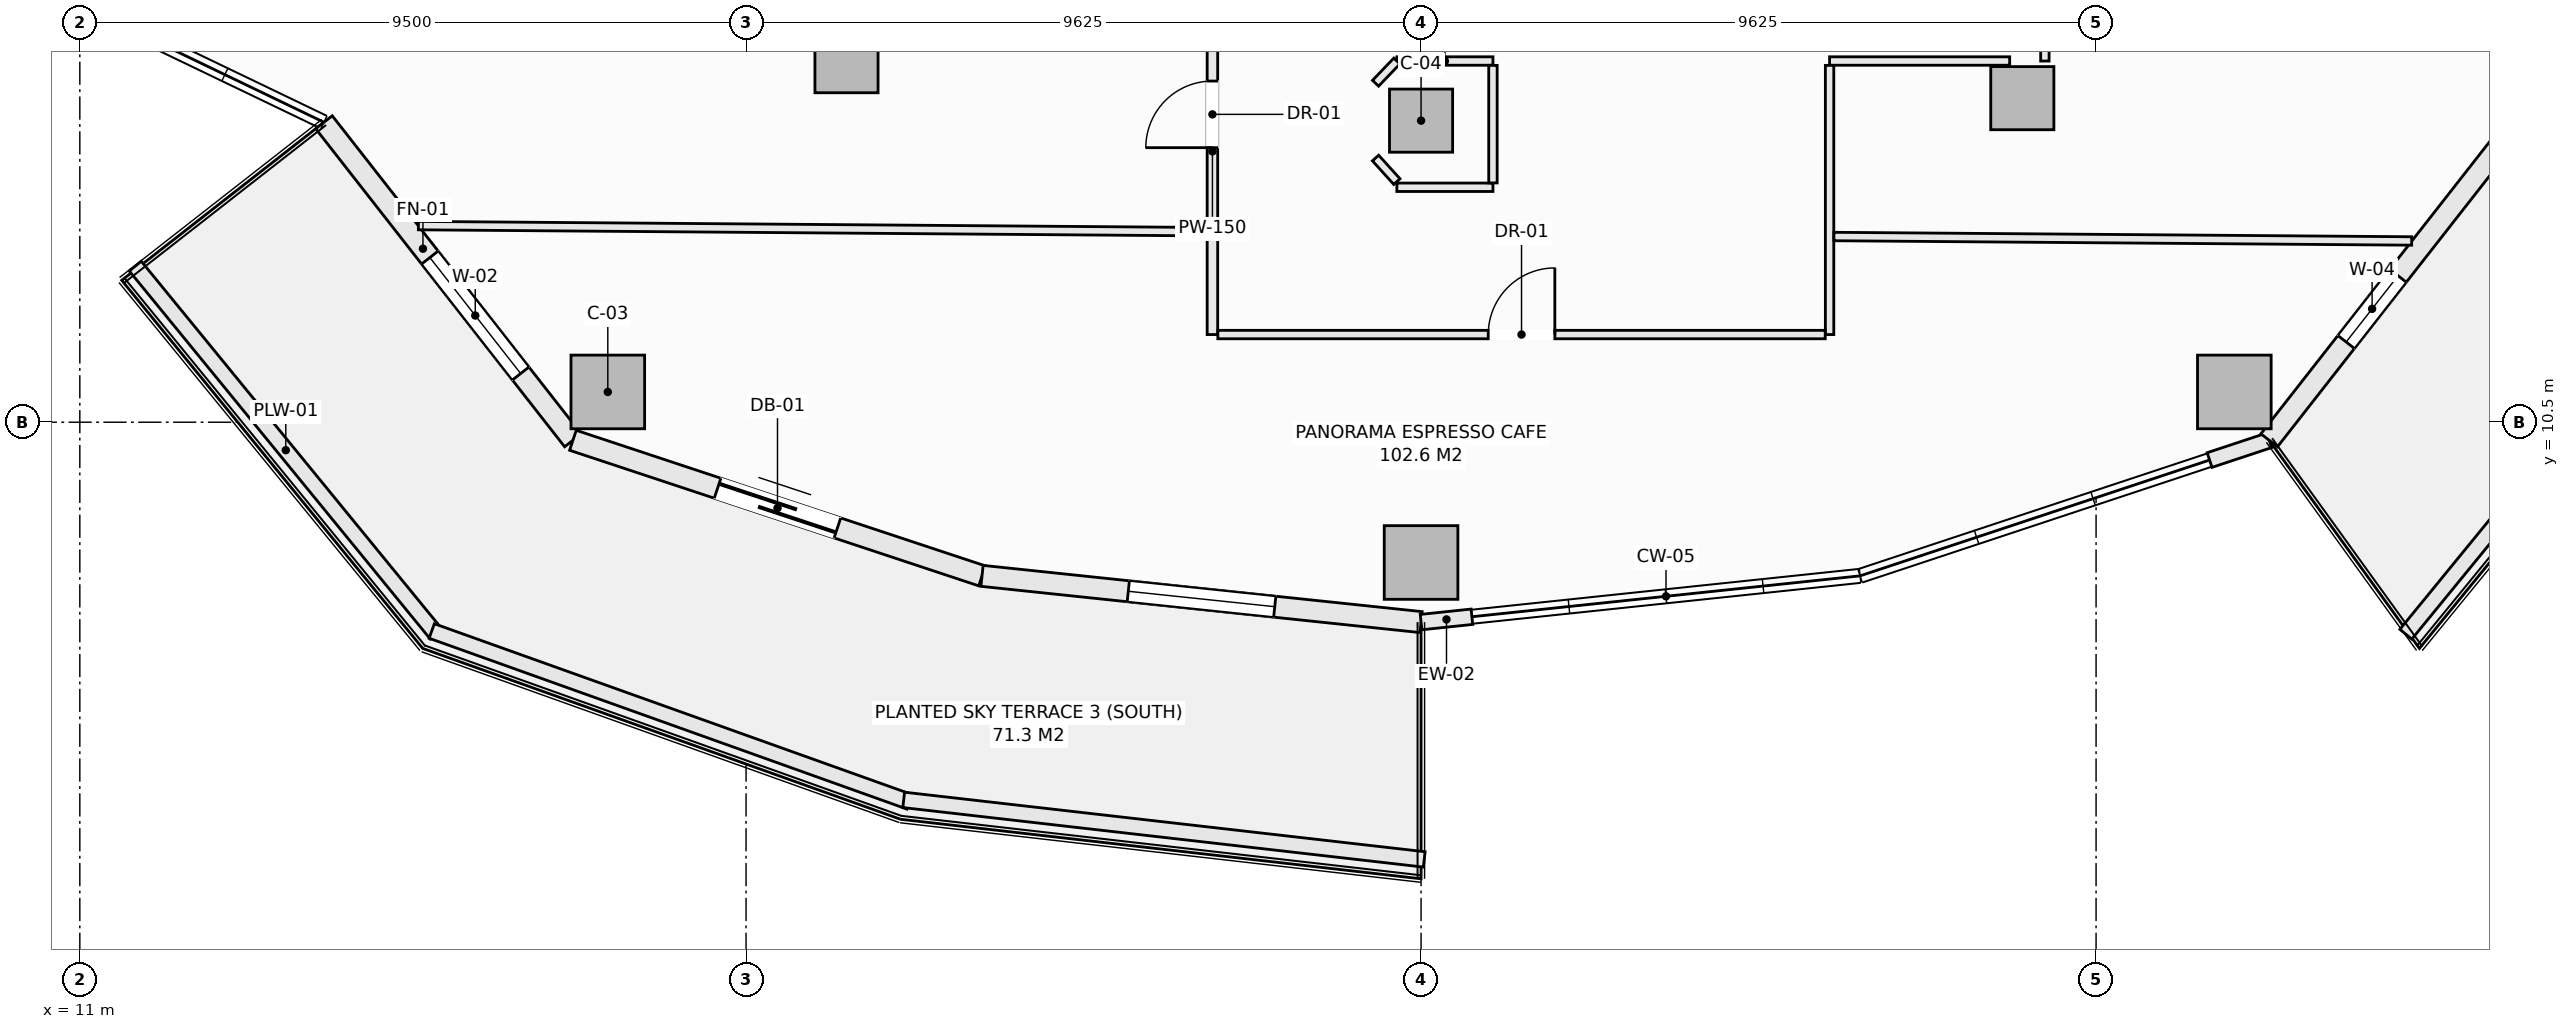
"""IFC4 building model, lengths in metres.
Left out: names, types, materials, properties, quantities, classifications, styles, units other than length and angle.
Written with IfcOpenShell. Run it as: python <this file> out.ifc"""

import sys

from ifc_helpers import new_model, si_unit, direction, frame, frame_2d, origin, origin_2d, place, context, subcontext, project, spatial, rectangle, extrude, element, fill, save


model = new_model("IFC4")
c1 = context("Model", 3, precision=1e-05, world=origin(), true_north=direction((0.0, 1.0)))
c2 = subcontext(c1, "Body", "Model", "MODEL_VIEW")
j1 = project(units=[si_unit("LENGTHUNIT", "METRE"), si_unit("PLANEANGLEUNIT", "RADIAN")], contexts=[c1])
p1 = place(None, origin())
s1 = spatial("IfcSite", under=j1, at=p1, CompositionType="ELEMENT")
p2 = place(p1, origin())
s2 = spatial("IfcBuilding", under=s1, at=p2, CompositionType="ELEMENT")
p3 = place(p2, frame((0.0, 0.0, 100.8)))
s3 = spatial("IfcBuildingStorey", under=s2, at=p3, CompositionType="ELEMENT", Elevation=100.8)
for number, where, z_axis, x_axis in (
    (1, (18.529, 10.932, -0.28), (0.0, 0.0, 1.0), (1.0, 0.0, 0.0)),
    (2, (30.125, 8.5, -0.28), (0.0, 0.0, 1.0), (1.0, 0.0, 0.0)),
    (3, (41.721, 10.932, -0.28), (0.0, 0.0, 1.0), (1.0, 0.0, 0.0)),
):
    element("IfcColumn", number, at=place(p3, frame(where, z_axis=z_axis, x_axis=x_axis)), inside=s3, PredefinedType="COLUMN", context=c2, shape_type="SweptSolid", body=[
        extrude(rectangle(XDim=1.05, YDim=1.05, at=origin_2d()), origin(), (0.0, 0.0, 1.0), 4.51),
    ])
for number, where, z_axis, x_axis in (
    (4, (21.932, 15.648, -0.28), (0.0, 0.0, 1.0), (1.0, 0.0, 0.0)),
    (5, (30.125, 14.8, -0.28), (0.0, 0.0, 1.0), (1.0, 0.0, 0.0)),
    (6, (38.698, 15.121, -0.28), (0.0, 0.0, 1.0), (1.0, 0.0, 0.0)),
):
    element("IfcColumn", number, at=place(p3, frame(where, z_axis=z_axis, x_axis=x_axis)), inside=s3, PredefinedType="COLUMN", context=c2, shape_type="SweptSolid", body=[
        extrude(rectangle(XDim=0.9, YDim=0.9, at=origin_2d()), origin(), (0.0, 0.0, 1.0), 4.51),
    ])
p4 = place(p3, frame((14.481, 14.777, 0.0), z_axis=(0.0, 0.0, 1.0), x_axis=(0.616435134162, -0.787405693001, 0.0)))
e7 = element("IfcWall", 7, at=p4, inside=s3, PredefinedType="SOLIDWALL", context=c2, shape_type="SweptSolid", body=[
    extrude(rectangle(XDim=5.759, YDim=0.3, at=frame_2d((2.879, 0.0))), origin(), (0.0, 0.0, 1.0), 3.753),
])
p5 = place(p4, frame((2.45, 0.0, 0.74)))
e8 = element("IfcOpeningElement", 8, at=p5, cuts=e7, PredefinedType="OPENING", context=c2, shape_type="SweptSolid", body=[
    extrude(rectangle(XDim=2.1, YDim=1.7, at=frame_2d((1.05, 0.85))), frame((0.0, 0.16, 0.0), z_axis=(0.0, -1.0, 0.0), x_axis=(1.0, 0.0, 0.0)), (0.0, 0.0, 1.0), 0.32),
])
p6 = place(p3, frame((18.031, 10.242, 0.0), z_axis=(0.0, 0.0, 1.0), x_axis=(0.949238009374, -0.314558741032, 0.0)))
e9 = element("IfcWall", 9, at=p6, inside=s3, PredefinedType="SOLIDWALL", context=c2, shape_type="SweptSolid", body=[
    extrude(rectangle(XDim=6.146, YDim=0.3, at=frame_2d((3.073, 0.0))), origin(), (0.0, 0.0, 1.0), 3.753),
])
p7 = place(p6, frame((2.173, 0.0, 0.0)))
e10 = element("IfcOpeningElement", 10, at=p7, cuts=e9, PredefinedType="OPENING", context=c2, shape_type="SweptSolid", body=[
    extrude(rectangle(XDim=1.8, YDim=2.25, at=frame_2d((0.9, 1.125))), frame((0.0, 0.16, 0.0), z_axis=(0.0, -1.0, 0.0), x_axis=(1.0, 0.0, 0.0)), (0.0, 0.0, 1.0), 0.32),
])
p8 = place(p3, frame((23.865, 8.309, 0.0), z_axis=(0.0, 0.0, 1.0), x_axis=(0.994498012394, -0.104755445421, 0.0)))
e11 = element("IfcWall", 11, at=p8, inside=s3, PredefinedType="SOLIDWALL", context=c2, shape_type="SweptSolid", body=[
    extrude(rectangle(XDim=6.295, YDim=0.3, at=frame_2d((3.147, 0.0))), origin(), (0.0, 0.0, 1.0), 3.753),
])
p9 = place(p8, frame((2.097, 0.0, 0.74)))
e12 = element("IfcOpeningElement", 12, at=p9, cuts=e11, PredefinedType="OPENING", context=c2, shape_type="SweptSolid", body=[
    extrude(rectangle(XDim=2.1, YDim=1.7, at=frame_2d((1.05, 0.85))), frame((0.0, 0.16, 0.0), z_axis=(0.0, -1.0, 0.0), x_axis=(1.0, 0.0, 0.0)), (0.0, 0.0, 1.0), 0.32),
])
p10 = place(p3, frame((30.125, 7.65, 0.0), z_axis=(0.0, 0.0, 1.0), x_axis=(0.994492602029, 0.104806796106, 0.0)))
e13 = element("IfcWall", 13, at=p10, inside=s3, PredefinedType="SOLIDWALL", context=c2, shape_type="SweptSolid", body=[
    extrude(rectangle(XDim=0.729, YDim=0.22, at=frame_2d((0.365, 0.0))), origin(), (0.0, 0.0, 1.0), 3.753),
])
p11 = place(p3, frame((41.369, 9.961, 0.0), z_axis=(0.0, 0.0, 1.0), x_axis=(0.949227107477, 0.314591637573, 0.0)))
e14 = element("IfcWall", 14, at=p11, inside=s3, PredefinedType="SOLIDWALL", context=c2, shape_type="SweptSolid", body=[
    extrude(rectangle(XDim=0.896, YDim=0.22, at=frame_2d((0.448, 0.0))), origin(), (0.0, 0.0, 1.0), 3.753),
])
p12 = place(p3, frame((42.219, 10.242, 0.0), z_axis=(0.0, 0.0, 1.0), x_axis=(0.616435134162, 0.787405693001, 0.0)))
e15 = element("IfcWall", 15, at=p12, inside=s3, PredefinedType="SOLIDWALL", context=c2, shape_type="SweptSolid", body=[
    extrude(rectangle(XDim=5.759, YDim=0.3, at=frame_2d((2.879, 0.0))), origin(), (0.0, 0.0, 1.0), 3.753),
])
p13 = place(p12, frame((1.78, 0.0, 0.72)))
e16 = element("IfcOpeningElement", 16, at=p13, cuts=e15, PredefinedType="OPENING", context=c2, shape_type="SweptSolid", body=[
    extrude(rectangle(XDim=1.2, YDim=1.65, at=frame_2d((0.6, 0.825))), frame((0.0, 0.16, 0.0), z_axis=(0.0, -1.0, 0.0), x_axis=(1.0, 0.0, 0.0)), (0.0, 0.0, 1.0), 0.32),
])
p14 = place(p3, frame((11.791, 12.726, 0.0), z_axis=(0.0, 0.0, 1.0), x_axis=(0.633002467947, -0.77414977593, 0.0)))
e17 = element("IfcWall", 17, at=p14, inside=s3, PredefinedType="PARAPET", context=c2, shape_type="SweptSolid", body=[
    extrude(rectangle(XDim=6.78, YDim=0.22, at=frame_2d((3.39, 0.0))), origin(), (0.0, 0.0, 1.0), 0.52),
])
p15 = place(p3, frame((16.018, 7.523, 0.0), z_axis=(0.0, 0.0, 1.0), x_axis=(0.941632697311, -0.336642040387, 0.0)))
e18 = element("IfcWall", 18, at=p15, inside=s3, PredefinedType="PARAPET", context=c2, shape_type="SweptSolid", body=[
    extrude(rectangle(XDim=7.236, YDim=0.22, at=frame_2d((3.618, 0.0))), origin(), (0.0, 0.0, 1.0), 0.52),
])
p16 = place(p3, frame((22.748, 5.115, 0.0), z_axis=(0.0, 0.0, 1.0), x_axis=(0.993527615836, -0.11359082961, 0.0)))
e19 = element("IfcWall", 19, at=p16, inside=s3, PredefinedType="PARAPET", context=c2, shape_type="SweptSolid", body=[
    extrude(rectangle(XDim=7.471, YDim=0.22, at=frame_2d((3.735, 0.0))), origin(), (0.0, 0.0, 1.0), 0.52),
])
p17 = place(p3, frame((44.167, 7.477, 0.0), z_axis=(0.0, 0.0, 1.0), x_axis=(0.633002467947, 0.77414977593, 0.0)))
e20 = element("IfcWall", 20, at=p17, inside=s3, PredefinedType="PARAPET", context=c2, shape_type="SweptSolid", body=[
    extrude(rectangle(XDim=6.78, YDim=0.22, at=frame_2d((3.39, 0.0))), origin(), (0.0, 0.0, 1.0), 0.52),
])
p18 = place(p3, frame((27.15, 11.75, 0.0), z_axis=(0.0, 0.0, 1.0), x_axis=(0.0, 1.0, 0.0)))
e21 = element("IfcWall", 21, at=p18, inside=s3, PredefinedType="PARTITIONING", context=c2, shape_type="SweptSolid", body=[
    extrude(rectangle(XDim=5.223, YDim=0.15, at=frame_2d((2.611, 0.0))), origin(), (0.0, 0.0, 1.0), 4.23),
])
p19 = place(p18, frame((2.665, 0.0, 0.0)))
e22 = element("IfcOpeningElement", 22, at=p19, cuts=e21, PredefinedType="OPENING", context=c2, shape_type="SweptSolid", body=[
    extrude(rectangle(XDim=0.95, YDim=2.1, at=frame_2d((0.475, 1.05))), frame((0.0, 0.085, 0.0), z_axis=(0.0, -1.0, 0.0), x_axis=(1.0, 0.0, 0.0)), (0.0, 0.0, 1.0), 0.17),
])
p20 = place(p3, frame((29.78, 15.65, 0.0), z_axis=(0.0, 0.0, 1.0), x_axis=(1.0, 0.0, 0.0)))
e23 = element("IfcWall", 23, at=p20, inside=s3, PredefinedType="PARTITIONING", context=c2, shape_type="SweptSolid", body=[
    extrude(rectangle(XDim=1.37, YDim=0.12, at=frame_2d((0.685, 0.0))), origin(), (0.0, 0.0, 1.0), 4.23),
])
p21 = place(p3, frame((35.95, 15.65, 0.0), z_axis=(0.0, 0.0, 1.0), x_axis=(1.0, 0.0, 0.0)))
e24 = element("IfcWall", 24, at=p21, inside=s3, PredefinedType="PARTITIONING", context=c2, shape_type="SweptSolid", body=[
    extrude(rectangle(XDim=2.568, YDim=0.12, at=frame_2d((1.284, 0.0))), origin(), (0.0, 0.0, 1.0), 4.23),
])
p22 = place(p3, frame((35.95, 11.75, 0.0), z_axis=(0.0, 0.0, 1.0), x_axis=(0.0, 1.0, 0.0)))
e25 = element("IfcWall", 25, at=p22, inside=s3, PredefinedType="PARTITIONING", context=c2, shape_type="SweptSolid", body=[
    extrude(rectangle(XDim=3.838, YDim=0.12, at=frame_2d((1.919, 0.0))), origin(), (0.0, 0.0, 1.0), 4.23),
])
p23 = place(p3, frame((27.227, 11.75, 0.0), z_axis=(0.0, 0.0, 1.0), x_axis=(1.0, 0.0, 0.0)))
e26 = element("IfcWall", 26, at=p23, inside=s3, PredefinedType="PARTITIONING", context=c2, shape_type="SweptSolid", body=[
    extrude(rectangle(XDim=8.661, YDim=0.12, at=frame_2d((4.331, 0.0))), origin(), (0.0, 0.0, 1.0), 4.23),
])
p24 = place(p23, frame((3.855, 0.0, 0.0)))
e27 = element("IfcOpeningElement", 27, at=p24, cuts=e26, PredefinedType="OPENING", context=c2, shape_type="SweptSolid", body=[
    extrude(rectangle(XDim=0.95, YDim=2.1, at=frame_2d((0.475, 1.05))), frame((0.0, 0.07, 0.0), z_axis=(0.0, -1.0, 0.0), x_axis=(1.0, 0.0, 0.0)), (0.0, 0.0, 1.0), 0.14),
])
p25 = place(p3, frame((39.02, 15.65, 0.0), z_axis=(0.0, 0.0, 1.0), x_axis=(0.0, 1.0, 0.0)))
e28 = element("IfcWall", 28, at=p25, inside=s3, PredefinedType="PARTITIONING", context=c2, shape_type="SweptSolid", body=[
    extrude(rectangle(XDim=1.36, YDim=0.12, at=frame_2d((0.68, 0.0))), origin(), (0.0, 0.0, 1.0), 3.605),
])
p26 = place(p3, frame((29.476, 15.333, 0.0), z_axis=(0.0, 0.0, 1.0), x_axis=(0.692219273951, 0.721687243043, 0.0)))
e29 = element("IfcWall", 29, at=p26, inside=s3, PredefinedType="PARTITIONING", context=c2, shape_type="SweptSolid", body=[
    extrude(rectangle(XDim=0.439, YDim=0.12, at=frame_2d((0.22, 0.0))), origin(), (0.0, 0.0, 1.0), 4.23),
])
p27 = place(p3, frame((29.476, 14.267, 0.0), z_axis=(0.0, 0.0, 1.0), x_axis=(0.670659392016, -0.741765448037, 0.0)))
e30 = element("IfcWall", 30, at=p27, inside=s3, PredefinedType="PARTITIONING", context=c2, shape_type="SweptSolid", body=[
    extrude(rectangle(XDim=0.453, YDim=0.12, at=frame_2d((0.227, 0.0))), origin(), (0.0, 0.0, 1.0), 4.23),
])
p28 = place(p3, frame((29.78, 13.85, 0.0), z_axis=(0.0, 0.0, 1.0), x_axis=(1.0, 0.0, 0.0)))
e31 = element("IfcWall", 31, at=p28, inside=s3, PredefinedType="PARTITIONING", context=c2, shape_type="SweptSolid", body=[
    extrude(rectangle(XDim=1.37, YDim=0.12, at=frame_2d((0.685, 0.0))), origin(), (0.0, 0.0, 1.0), 4.23),
])
p29 = place(p3, frame((31.15, 13.912, 0.0), z_axis=(0.0, 0.0, 1.0), x_axis=(0.0, 1.0, 0.0)))
e32 = element("IfcWall", 32, at=p29, inside=s3, PredefinedType="PARTITIONING", context=c2, shape_type="SweptSolid", body=[
    extrude(rectangle(XDim=1.676, YDim=0.12, at=frame_2d((0.838, 0.0))), origin(), (0.0, 0.0, 1.0), 4.23),
])
p30 = place(p3, frame((15.828, 13.303, 0.0), z_axis=(0.0, 0.0, 1.0), x_axis=(0.999970299792, -0.007707109345, 0.0)))
e33 = element("IfcWall", 33, at=p30, inside=s3, PredefinedType="PARTITIONING", context=c2, shape_type="SweptSolid", body=[
    extrude(rectangle(XDim=11.245, YDim=0.12, at=frame_2d((5.623, 0.0))), origin(), (0.0, 0.0, 1.0), 4.23),
])
p31 = place(p3, frame((36.012, 13.148, 0.0), z_axis=(0.0, 0.0, 1.0), x_axis=(0.999970319002, -0.007704616475, 0.0)))
e34 = element("IfcWall", 34, at=p31, inside=s3, PredefinedType="PARTITIONING", context=c2, shape_type="SweptSolid", body=[
    extrude(rectangle(XDim=8.239, YDim=0.12, at=frame_2d((4.119, 0.0))), origin(), (0.0, 0.0, 1.0), 3.753),
])
p32 = place(p5, origin())
e35 = element("IfcWindow", 35, at=p32, inside=s3, PartitioningType="SINGLE_PANEL", PredefinedType="WINDOW", context=c2, shape_type="SweptSolid", body=[
    extrude(rectangle(XDim=2.1, YDim=1.7, at=frame_2d((1.05, 0.85))), frame((0.0, 0.03, 0.0), z_axis=(0.0, -1.0, 0.0), x_axis=(1.0, 0.0, 0.0)), (0.0, 0.0, 1.0), 0.06),
])
fill(e8, e35)
p33 = place(p7, frame((1.8, 0.0, 0.0), z_axis=(0.0, 0.0, 1.0), x_axis=(-1.0, 0.0, 0.0)))
e36 = element("IfcDoor", 36, at=p33, inside=s3, OperationType="SLIDING_TO_LEFT", PredefinedType="DOOR", context=c2, shape_type="SweptSolid", body=[
    extrude(rectangle(XDim=1.8, YDim=2.25, at=frame_2d((0.9, 1.125))), frame((0.0, 0.025, 0.0), z_axis=(0.0, -1.0, 0.0), x_axis=(1.0, 0.0, 0.0)), (0.0, 0.0, 1.0), 0.05),
])
fill(e10, e36)
p34 = place(p9, origin())
e37 = element("IfcWindow", 37, at=p34, inside=s3, PartitioningType="SINGLE_PANEL", PredefinedType="WINDOW", context=c2, shape_type="SweptSolid", body=[
    extrude(rectangle(XDim=2.1, YDim=1.7, at=frame_2d((1.05, 0.85))), frame((0.0, 0.03, 0.0), z_axis=(0.0, -1.0, 0.0), x_axis=(1.0, 0.0, 0.0)), (0.0, 0.0, 1.0), 0.06),
])
fill(e12, e37)
p35 = place(p13, origin())
e38 = element("IfcWindow", 38, at=p35, inside=s3, PartitioningType="SINGLE_PANEL", PredefinedType="WINDOW", context=c2, shape_type="SweptSolid", body=[
    extrude(rectangle(XDim=1.2, YDim=1.65, at=frame_2d((0.6, 0.825))), frame((0.0, 0.03, 0.0), z_axis=(0.0, -1.0, 0.0), x_axis=(1.0, 0.0, 0.0)), (0.0, 0.0, 1.0), 0.06),
])
fill(e16, e38)
p36 = place(p19, origin())
e39 = element("IfcDoor", 39, at=p36, inside=s3, OperationType="SINGLE_SWING_LEFT", PredefinedType="DOOR", context=c2, shape_type="SweptSolid", body=[
    extrude(rectangle(XDim=0.95, YDim=2.1, at=frame_2d((0.475, 1.05))), frame((0.0, 0.025, 0.0), z_axis=(0.0, -1.0, 0.0), x_axis=(1.0, 0.0, 0.0)), (0.0, 0.0, 1.0), 0.05),
])
fill(e22, e39)
p37 = place(p24, origin())
e40 = element("IfcDoor", 40, at=p37, inside=s3, OperationType="SINGLE_SWING_RIGHT", PredefinedType="DOOR", context=c2, shape_type="SweptSolid", body=[
    extrude(rectangle(XDim=0.95, YDim=2.1, at=frame_2d((0.475, 1.05))), frame((0.0, 0.025, 0.0), z_axis=(0.0, -1.0, 0.0), x_axis=(1.0, 0.0, 0.0)), (0.0, 0.0, 1.0), 0.05),
])
fill(e27, e40)
save(model, sys.argv[1])
